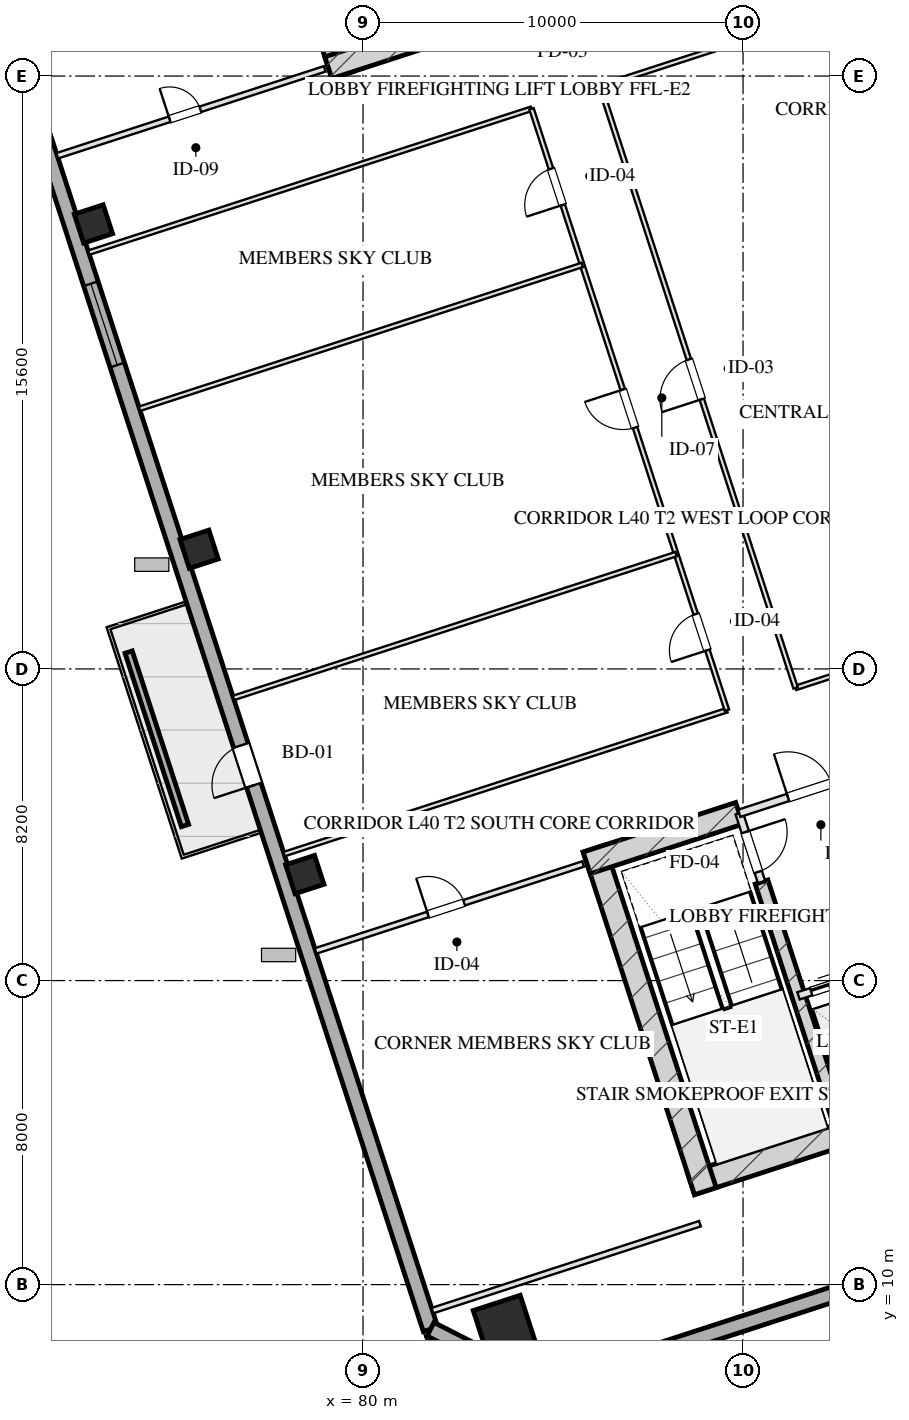
"""IFC4 building model, lengths in metres.
Left out: names, types, materials, properties, quantities, classifications, styles, units other than length and angle.
Written with IfcOpenShell. Run it as: python <this file> out.ifc"""

import sys

from ifc_helpers import new_model, si_unit, direction, frame, frame_2d, origin, origin_2d, place, context, subcontext, project, spatial, rectangle, hollow_rectangle, extrude, element, fill, save


model = new_model("IFC4")
c1 = context("Model", 3, precision=1e-05, world=origin(), true_north=direction((0.0, 1.0)))
c2 = subcontext(c1, "Body", "Model", "MODEL_VIEW")
j1 = project(units=[si_unit("LENGTHUNIT", "METRE"), si_unit("PLANEANGLEUNIT", "RADIAN")], contexts=[c1])
p1 = place(None, origin())
s1 = spatial("IfcSite", under=j1, at=p1, CompositionType="ELEMENT")
p2 = place(p1, origin())
s2 = spatial("IfcBuilding", under=s1, at=p2, CompositionType="ELEMENT")
p3 = place(p2, frame((0.0, 0.0, 152.95)))
s3 = spatial("IfcBuildingStorey", under=s2, at=p3, CompositionType="ELEMENT", Elevation=152.95)
p4 = place(p3, frame((88.63, 12.652, 0.0), z_axis=(0.0, 0.0, 1.0), x_axis=(0.95105714907, 0.309015046886, 0.0)))
e1 = element("IfcWall", 1, at=p4, inside=s3, PredefinedType="SHEAR", context=c2, shape_type="SweptSolid", body=[
    extrude(rectangle(XDim=16.4, YDim=0.6, at=frame_2d((8.2, 0.0))), origin(), (0.0, 0.0, 1.0), 3.45),
])
p5 = place(p3, frame((86.078, 21.475, 0.0), z_axis=(0.0, 0.0, 1.0), x_axis=(0.309017938678, -0.951056209472, 0.0)))
e2 = element("IfcWall", 2, at=p5, inside=s3, PredefinedType="SHEAR", context=c2, shape_type="SweptSolid", body=[
    extrude(rectangle(XDim=9.48, YDim=0.6, at=frame_2d((4.74, 0.0))), origin(), (0.0, 0.0, 1.0), 3.45),
])
p6 = place(p3, frame((90.486, 20.594, 0.0), z_axis=(0.0, 0.0, 1.0), x_axis=(0.309020428229, -0.951055400562, 0.0)))
e3 = element("IfcWall", 3, at=p6, inside=s3, PredefinedType="SHEAR", context=c2, shape_type="SweptSolid", body=[
    extrude(rectangle(XDim=6.98, YDim=0.35, at=frame_2d((3.49, 0.0))), origin(), (0.0, 0.0, 1.0), 3.45),
])
p7 = place(p3, frame((85.886, 21.097, 0.0), z_axis=(0.0, 0.0, 1.0), x_axis=(0.951068073652, 0.308981422225, 0.0)))
e4 = element("IfcWall", 4, at=p7, inside=s3, PredefinedType="SHEAR", context=c2, shape_type="SweptSolid", body=[
    extrude(rectangle(XDim=4.22, YDim=0.6, at=frame_2d((2.11, 0.0))), origin(), (0.0, 0.0, 1.0), 3.45),
])
p8 = place(p3, frame((79.466, 41.828, 0.0), z_axis=(0.0, 0.0, 1.0), x_axis=(-0.309041232772, 0.951048640421, 0.0)))
e5 = element("IfcWall", 5, at=p8, inside=s3, PredefinedType="SHEAR", context=c2, shape_type="SweptSolid", body=[
    extrude(rectangle(XDim=9.48, YDim=0.6, at=frame_2d((4.74, 0.0))), origin(), (0.0, 0.0, 1.0), 3.45),
])
p9 = place(p3, frame((79.087, 42.021, 0.0), z_axis=(0.0, 0.0, 1.0), x_axis=(0.951062550203, 0.3089984233, 0.0)))
e6 = element("IfcWall", 6, at=p9, inside=s3, PredefinedType="SHEAR", context=c2, shape_type="SweptSolid", body=[
    extrude(rectangle(XDim=4.22, YDim=0.6, at=frame_2d((2.11, 0.0))), origin(), (0.0, 0.0, 1.0), 3.45),
])
p10 = place(p3, frame((83.719, 8.901, 0.0), z_axis=(0.0, 0.0, 1.0), x_axis=(0.951056516295, 0.309016994375, 0.0)))
e7 = element("IfcColumn", 7, at=p10, inside=s3, PredefinedType="COLUMN", context=c2, shape_type="SweptSolid", body=[
    extrude(hollow_rectangle(XDim=1.3, YDim=1.3, WallThickness=0.045, at=origin_2d()), origin(), (0.0, 0.0, 1.0), 3.451),
])
for number, where, z_axis, x_axis in (
    (8, (78.468, 20.79, 0.0), (0.0, 0.0, 1.0), (0.951, 0.309, 0.0)),
    (9, (75.687, 29.349, 0.0), (0.0, 0.0, 1.0), (0.951, 0.309, 0.0)),
    (10, (72.906, 37.909, 0.0), (0.0, 0.0, 1.0), (0.951, 0.309, 0.0)),
):
    element("IfcColumn", number, at=place(p3, frame(where, z_axis=z_axis, x_axis=x_axis)), inside=s3, PredefinedType="COLUMN", context=c2, shape_type="SweptSolid", body=[
        extrude(hollow_rectangle(XDim=0.8, YDim=0.8, WallThickness=0.028, at=origin_2d()), origin(), (0.0, 0.0, 1.0), 3.451),
    ])
p11 = place(p3, frame((81.776, 8.827, 0.0), z_axis=(0.0, 0.0, 1.0), x_axis=(-0.309014228706, 0.951057414911, 0.0)))
e11 = element("IfcWall", 11, at=p11, inside=s3, PredefinedType="SOLIDWALL", context=c2, shape_type="SweptSolid", body=[
    extrude(rectangle(XDim=42.8, YDim=0.4, at=frame_2d((21.4, 0.0))), origin(), (0.0, 0.0, 1.0), 2.61),
])
p12 = place(p11, frame((26.675, 0.0, 0.75)))
e12 = element("IfcOpeningElement", 12, at=p12, cuts=e11, PredefinedType="OPENING", context=c2, shape_type="SweptSolid", body=[
    extrude(rectangle(XDim=2.25, YDim=1.46, at=frame_2d((1.125, 0.73))), frame((0.0, 0.21, 0.0), z_axis=(0.0, -1.0, 0.0), x_axis=(1.0, 0.0, 0.0)), (0.0, 0.0, 1.0), 0.42),
])
p13 = place(p11, frame((15.05, 0.0, 0.0)))
e13 = element("IfcOpeningElement", 13, at=p13, cuts=e11, PredefinedType="OPENING", context=c2, shape_type="SweptSolid", body=[
    extrude(rectangle(XDim=1.1, YDim=2.15, at=frame_2d((0.55, 1.075))), frame((0.0, 0.21, 0.0), z_axis=(0.0, -1.0, 0.0), x_axis=(1.0, 0.0, 0.0)), (0.0, 0.0, 1.0), 0.42),
])
p14 = place(p3, frame((109.908, 15.444, 0.0), z_axis=(0.0, 0.0, 1.0), x_axis=(-0.951057580055, -0.30901372044, 0.0)))
e14 = element("IfcWall", 14, at=p14, inside=s3, PredefinedType="SOLIDWALL", context=c2, shape_type="SweptSolid", body=[
    extrude(rectangle(XDim=26.4, YDim=0.4, at=frame_2d((13.2, 0.0))), origin(), (0.0, 0.0, 1.0), 2.61),
])
p15 = place(p3, frame((84.801, 7.286, 0.0), z_axis=(0.0, 0.0, 1.0), x_axis=(-0.891020832027, 0.453962417932, 0.0)))
e15 = element("IfcWall", 15, at=p15, inside=s3, PredefinedType="SOLIDWALL", context=c2, shape_type="SweptSolid", body=[
    extrude(rectangle(XDim=3.394, YDim=0.4, at=frame_2d((1.697, 0.0))), origin(), (0.0, 0.0, 1.0), 2.61),
])
p16 = place(p3, frame((75.315, 22.079, 0.0), z_axis=(0.0, 0.0, 1.0), x_axis=(-0.309032019345, 0.951051634255, 0.0)))
e16 = element("IfcWall", 16, at=p16, inside=s3, PredefinedType="PARAPET", context=c2, shape_type="SweptSolid", body=[
    extrude(rectangle(XDim=4.8, YDim=0.2, at=frame_2d((2.4, 0.0))), origin(), (0.0, 0.0, 1.0), 0.75),
])
p17 = place(p3, frame((89.899, 22.401, 0.0), z_axis=(0.0, 0.0, 1.0), x_axis=(0.308932062672, -0.951084108086, 0.0)))
e17 = element("IfcWall", 17, at=p17, inside=s3, PredefinedType="PARTITIONING", context=c2, shape_type="SweptSolid", body=[
    extrude(rectangle(XDim=1.9, YDim=0.2, at=frame_2d((0.95, 0.0))), origin(), (0.0, 0.0, 1.0), 3.175),
])
p18 = place(p17, frame((0.52, 0.0, 0.0)))
e18 = element("IfcOpeningElement", 18, at=p18, cuts=e17, PredefinedType="OPENING", context=c2, shape_type="SweptSolid", body=[
    extrude(rectangle(XDim=1.1, YDim=2.05, at=frame_2d((0.55, 1.025))), frame((0.0, 0.11, 0.0), z_axis=(0.0, -1.0, 0.0), x_axis=(1.0, 0.0, 0.0)), (0.0, 0.0, 1.0), 0.22),
])
p19 = place(p3, frame((89.899, 22.401, 0.0), z_axis=(0.0, 0.0, 1.0), x_axis=(0.951046716504, 0.309047153403, 0.0)))
e19 = element("IfcWall", 19, at=p19, inside=s3, PredefinedType="PARTITIONING", context=c2, shape_type="SweptSolid", body=[
    extrude(rectangle(XDim=3.83, YDim=0.2, at=frame_2d((1.915, 0.0))), origin(), (0.0, 0.0, 1.0), 3.175),
])
p20 = place(p19, frame((1.35, 0.0, 0.0)))
e20 = element("IfcOpeningElement", 20, at=p20, cuts=e19, PredefinedType="OPENING", context=c2, shape_type="SweptSolid", body=[
    extrude(rectangle(XDim=1.2, YDim=2.05, at=frame_2d((0.6, 1.025))), frame((0.0, 0.11, 0.0), z_axis=(0.0, -1.0, 0.0), x_axis=(1.0, 0.0, 0.0)), (0.0, 0.0, 1.0), 0.22),
])
p21 = place(p3, frame((91.46, 17.598, 0.0), z_axis=(0.0, 0.0, 1.0), x_axis=(0.951062257173, 0.308999325213, 0.0)))
e21 = element("IfcWall", 21, at=p21, inside=s3, PredefinedType="PARTITIONING", context=c2, shape_type="SweptSolid", body=[
    extrude(rectangle(XDim=2.1, YDim=0.2, at=frame_2d((1.05, 0.0))), origin(), (0.0, 0.0, 1.0), 3.175),
])
p22 = place(p21, frame((0.35, 0.0, 0.0)))
e22 = element("IfcOpeningElement", 22, at=p22, cuts=e21, PredefinedType="OPENING", context=c2, shape_type="SweptSolid", body=[
    extrude(rectangle(XDim=1.1, YDim=2.05, at=frame_2d((0.55, 1.025))), frame((0.0, 0.11, 0.0), z_axis=(0.0, -1.0, 0.0), x_axis=(1.0, 0.0, 0.0)), (0.0, 0.0, 1.0), 0.22),
])
p23 = place(p3, frame((81.828, 9.316, 0.0), z_axis=(0.0, 0.0, 1.0), x_axis=(0.95105128112, 0.309033106124, 0.0)))
e23 = element("IfcWall", 23, at=p23, inside=s3, PredefinedType="PARTITIONING", context=c2, shape_type="SweptSolid", body=[
    extrude(rectangle(XDim=7.4, YDim=0.15, at=frame_2d((3.7, 0.0))), origin(), (0.0, 0.0, 1.0), 3.175),
])
p24 = place(p3, frame((78.753, 18.78, 0.0), z_axis=(0.0, 0.0, 1.0), x_axis=(0.951060977215, 0.309003264738, 0.0)))
e24 = element("IfcWall", 24, at=p24, inside=s3, PredefinedType="PARTITIONING", context=c2, shape_type="SweptSolid", body=[
    extrude(rectangle(XDim=7.4, YDim=0.15, at=frame_2d((3.7, 0.0))), origin(), (0.0, 0.0, 1.0), 3.175),
])
p25 = place(p24, frame((3.108, 0.0, 0.0)))
e25 = element("IfcOpeningElement", 25, at=p25, cuts=e24, PredefinedType="OPENING", context=c2, shape_type="SweptSolid", body=[
    extrude(rectangle(XDim=1.0, YDim=2.05, at=frame_2d((0.5, 1.025))), frame((0.0, 0.085, 0.0), z_axis=(0.0, -1.0, 0.0), x_axis=(1.0, 0.0, 0.0)), (0.0, 0.0, 1.0), 0.17),
])
p26 = place(p3, frame((71.955, 39.703, 0.0), z_axis=(0.0, 0.0, 1.0), x_axis=(0.951060977215, 0.309003264738, 0.0)))
e26 = element("IfcWall", 26, at=p26, inside=s3, PredefinedType="PARTITIONING", context=c2, shape_type="SweptSolid", body=[
    extrude(rectangle(XDim=7.4, YDim=0.15, at=frame_2d((3.7, 0.0))), origin(), (0.0, 0.0, 1.0), 3.175),
])
p27 = place(p26, frame((3.108, 0.0, 0.0)))
e27 = element("IfcOpeningElement", 27, at=p27, cuts=e26, PredefinedType="OPENING", context=c2, shape_type="SweptSolid", body=[
    extrude(rectangle(XDim=0.85, YDim=2.05, at=frame_2d((0.425, 1.025))), frame((0.0, 0.085, 0.0), z_axis=(0.0, -1.0, 0.0), x_axis=(1.0, 0.0, 0.0)), (0.0, 0.0, 1.0), 0.17),
])
p28 = place(p3, frame((77.925, 21.328, 0.0), z_axis=(0.0, 0.0, 1.0), x_axis=(0.95105749975, 0.309013967595, 0.0)))
e28 = element("IfcWall", 28, at=p28, inside=s3, PredefinedType="PARTITIONING", context=c2, shape_type="SweptSolid", body=[
    extrude(rectangle(XDim=12.25, YDim=0.12, at=frame_2d((6.125, 0.0))), origin(), (0.0, 0.0, 1.0), 3.175),
])
p29 = place(p3, frame((91.382, 25.701, 0.0), z_axis=(0.0, 0.0, 1.0), x_axis=(0.951061683147, 0.309001091988, 0.0)))
e29 = element("IfcWall", 29, at=p29, inside=s3, PredefinedType="PARTITIONING", context=c2, shape_type="SweptSolid", body=[
    extrude(rectangle(XDim=8.25, YDim=0.12, at=frame_2d((4.125, 0.0))), origin(), (0.0, 0.0, 1.0), 3.175),
])
p30 = place(p3, frame((72.783, 37.154, 0.0), z_axis=(0.0, 0.0, 1.0), x_axis=(0.9510516424, 0.30903199428, 0.0)))
e30 = element("IfcWall", 30, at=p30, inside=s3, PredefinedType="PARTITIONING", context=c2, shape_type="SweptSolid", body=[
    extrude(rectangle(XDim=12.25, YDim=0.12, at=frame_2d((6.125, 0.0))), origin(), (0.0, 0.0, 1.0), 3.175),
])
p31 = place(p3, frame((86.24, 41.527, 0.0), z_axis=(0.0, 0.0, 1.0), x_axis=(0.951058857521, 0.309009788731, 0.0)))
e31 = element("IfcWall", 31, at=p31, inside=s3, PredefinedType="PARTITIONING", context=c2, shape_type="SweptSolid", body=[
    extrude(rectangle(XDim=8.25, YDim=0.12, at=frame_2d((4.125, 0.0))), origin(), (0.0, 0.0, 1.0), 3.175),
])
p32 = place(p3, frame((89.575, 25.114, 0.0), z_axis=(0.0, 0.0, 1.0), x_axis=(-0.30901773025, 0.951056277195, 0.0)))
e32 = element("IfcWall", 32, at=p32, inside=s3, PredefinedType="PARTITIONING", context=c2, shape_type="SweptSolid", body=[
    extrude(rectangle(XDim=16.64, YDim=0.12, at=frame_2d((8.32, 0.0))), origin(), (0.0, 0.0, 1.0), 3.175),
])
p33 = place(p32, frame((1.66, 0.0, 0.0)))
e33 = element("IfcOpeningElement", 33, at=p33, cuts=e32, PredefinedType="OPENING", context=c2, shape_type="SweptSolid", body=[
    extrude(rectangle(XDim=1.0, YDim=2.05, at=frame_2d((0.5, 1.025))), frame((0.0, 0.07, 0.0), z_axis=(0.0, -1.0, 0.0), x_axis=(1.0, 0.0, 0.0)), (0.0, 0.0, 1.0), 0.14),
])
p34 = place(p32, frame((7.82, 0.0, 0.0)))
e34 = element("IfcOpeningElement", 34, at=p34, cuts=e32, PredefinedType="OPENING", context=c2, shape_type="SweptSolid", body=[
    extrude(rectangle(XDim=1.05, YDim=2.05, at=frame_2d((0.525, 1.025))), frame((0.0, 0.07, 0.0), z_axis=(0.0, -1.0, 0.0), x_axis=(1.0, 0.0, 0.0)), (0.0, 0.0, 1.0), 0.14),
])
p35 = place(p32, frame((13.98, 0.0, 0.0)))
e35 = element("IfcOpeningElement", 35, at=p35, cuts=e32, PredefinedType="OPENING", context=c2, shape_type="SweptSolid", body=[
    extrude(rectangle(XDim=1.0, YDim=2.05, at=frame_2d((0.5, 1.025))), frame((0.0, 0.07, 0.0), z_axis=(0.0, -1.0, 0.0), x_axis=(1.0, 0.0, 0.0)), (0.0, 0.0, 1.0), 0.14),
])
p36 = place(p3, frame((91.382, 25.701, 0.0), z_axis=(0.0, 0.0, 1.0), x_axis=(-0.309004459387, 0.951060589068, 0.0)))
e36 = element("IfcWall", 36, at=p36, inside=s3, PredefinedType="PARTITIONING", context=c2, shape_type="SweptSolid", body=[
    extrude(rectangle(XDim=16.64, YDim=0.12, at=frame_2d((8.32, 0.0))), origin(), (0.0, 0.0, 1.0), 3.175),
])
p37 = place(p36, frame((7.987, 0.0, 0.0)))
e37 = element("IfcOpeningElement", 37, at=p37, cuts=e36, PredefinedType="OPENING", context=c2, shape_type="SweptSolid", body=[
    extrude(rectangle(XDim=1.1, YDim=2.05, at=frame_2d((0.55, 1.025))), frame((0.0, 0.07, 0.0), z_axis=(0.0, -1.0, 0.0), x_axis=(1.0, 0.0, 0.0)), (0.0, 0.0, 1.0), 0.14),
])
for number, where, z_axis, x_axis in (
    (38, (76.59, 25.437, 0.0), (0.0, 0.0, 1.0), (0.951, 0.309, 0.0)),
    (39, (74.118, 33.045, 0.0), (0.0, 0.0, 1.0), (0.951, 0.309, 0.0)),
):
    element("IfcWall", number, at=place(p3, frame(where, z_axis=z_axis, x_axis=x_axis)), inside=s3, PredefinedType="PARTITIONING", context=c2, shape_type="SweptSolid", body=[
        extrude(rectangle(XDim=12.25, YDim=0.12, at=frame_2d((6.125, 0.0))), origin(), (0.0, 0.0, 1.0), 3.175),
    ])
p38 = place(p12, origin())
e40 = element("IfcWindow", 40, at=p38, inside=s3, PartitioningType="TRIPLE_PANEL_VERTICAL", PredefinedType="WINDOW", context=c2, shape_type="SweptSolid", body=[
    extrude(rectangle(XDim=2.25, YDim=1.46, at=frame_2d((1.125, 0.73))), frame((0.0, 0.03, 0.0), z_axis=(0.0, -1.0, 0.0), x_axis=(1.0, 0.0, 0.0)), (0.0, 0.0, 1.0), 0.06),
])
fill(e12, e40)
p39 = place(p13, origin())
e41 = element("IfcDoor", 41, at=p39, inside=s3, OperationType="SINGLE_SWING_LEFT", PredefinedType="DOOR", context=c2, shape_type="SweptSolid", body=[
    extrude(rectangle(XDim=1.1, YDim=2.15, at=frame_2d((0.55, 1.075))), frame((0.0, 0.025, 0.0), z_axis=(0.0, -1.0, 0.0), x_axis=(1.0, 0.0, 0.0)), (0.0, 0.0, 1.0), 0.05),
])
fill(e13, e41)
p40 = place(p18, origin())
e42 = element("IfcDoor", 42, at=p40, inside=s3, OperationType="SINGLE_SWING_LEFT", PredefinedType="DOOR", context=c2, shape_type="SweptSolid", body=[
    extrude(rectangle(XDim=1.1, YDim=2.05, at=frame_2d((0.55, 1.025))), frame((0.0, 0.025, 0.0), z_axis=(0.0, -1.0, 0.0), x_axis=(1.0, 0.0, 0.0)), (0.0, 0.0, 1.0), 0.05),
])
fill(e18, e42)
p41 = place(p20, origin())
e43 = element("IfcDoor", 43, at=p41, inside=s3, OperationType="SINGLE_SWING_LEFT", PredefinedType="DOOR", context=c2, shape_type="SweptSolid", body=[
    extrude(rectangle(XDim=1.2, YDim=2.05, at=frame_2d((0.6, 1.025))), frame((0.0, 0.025, 0.0), z_axis=(0.0, -1.0, 0.0), x_axis=(1.0, 0.0, 0.0)), (0.0, 0.0, 1.0), 0.05),
])
fill(e20, e43)
p42 = place(p22, origin())
e44 = element("IfcDoor", 44, at=p42, inside=s3, OperationType="DOUBLE_DOOR_SLIDING", PredefinedType="DOOR", context=c2, shape_type="SweptSolid", body=[
    extrude(rectangle(XDim=1.1, YDim=2.05, at=frame_2d((0.55, 1.025))), frame((0.0, 0.025, 0.0), z_axis=(0.0, -1.0, 0.0), x_axis=(1.0, 0.0, 0.0)), (0.0, 0.0, 1.0), 0.05),
])
fill(e22, e44)
p43 = place(p25, origin())
e45 = element("IfcDoor", 45, at=p43, inside=s3, OperationType="SINGLE_SWING_LEFT", PredefinedType="DOOR", context=c2, shape_type="SweptSolid", body=[
    extrude(rectangle(XDim=1.0, YDim=2.05, at=frame_2d((0.5, 1.025))), frame((0.0, 0.025, 0.0), z_axis=(0.0, -1.0, 0.0), x_axis=(1.0, 0.0, 0.0)), (0.0, 0.0, 1.0), 0.05),
])
fill(e25, e45)
p44 = place(p27, origin())
e46 = element("IfcDoor", 46, at=p44, inside=s3, OperationType="SINGLE_SWING_LEFT", PredefinedType="DOOR", context=c2, shape_type="SweptSolid", body=[
    extrude(rectangle(XDim=0.85, YDim=2.05, at=frame_2d((0.425, 1.025))), frame((0.0, 0.025, 0.0), z_axis=(0.0, -1.0, 0.0), x_axis=(1.0, 0.0, 0.0)), (0.0, 0.0, 1.0), 0.05),
])
fill(e27, e46)
p45 = place(p33, origin())
e47 = element("IfcDoor", 47, at=p45, inside=s3, OperationType="SINGLE_SWING_LEFT", PredefinedType="DOOR", context=c2, shape_type="SweptSolid", body=[
    extrude(rectangle(XDim=1.0, YDim=2.05, at=frame_2d((0.5, 1.025))), frame((0.0, 0.025, 0.0), z_axis=(0.0, -1.0, 0.0), x_axis=(1.0, 0.0, 0.0)), (0.0, 0.0, 1.0), 0.05),
])
fill(e33, e47)
p46 = place(p34, origin())
e48 = element("IfcDoor", 48, at=p46, inside=s3, OperationType="SINGLE_SWING_RIGHT", PredefinedType="DOOR", context=c2, shape_type="SweptSolid", body=[
    extrude(rectangle(XDim=1.05, YDim=2.05, at=frame_2d((0.525, 1.025))), frame((0.0, 0.025, 0.0), z_axis=(0.0, -1.0, 0.0), x_axis=(1.0, 0.0, 0.0)), (0.0, 0.0, 1.0), 0.05),
])
fill(e34, e48)
p47 = place(p35, origin())
e49 = element("IfcDoor", 49, at=p47, inside=s3, OperationType="SINGLE_SWING_LEFT", PredefinedType="DOOR", context=c2, shape_type="SweptSolid", body=[
    extrude(rectangle(XDim=1.0, YDim=2.05, at=frame_2d((0.5, 1.025))), frame((0.0, 0.025, 0.0), z_axis=(0.0, -1.0, 0.0), x_axis=(1.0, 0.0, 0.0)), (0.0, 0.0, 1.0), 0.05),
])
fill(e35, e49)
p48 = place(p37, origin())
e50 = element("IfcDoor", 50, at=p48, inside=s3, OperationType="SINGLE_SWING_LEFT", PredefinedType="DOOR", context=c2, shape_type="SweptSolid", body=[
    extrude(rectangle(XDim=1.1, YDim=2.05, at=frame_2d((0.55, 1.025))), frame((0.0, 0.025, 0.0), z_axis=(0.0, -1.0, 0.0), x_axis=(1.0, 0.0, 0.0)), (0.0, 0.0, 1.0), 0.05),
])
fill(e37, e50)
save(model, sys.argv[1])
